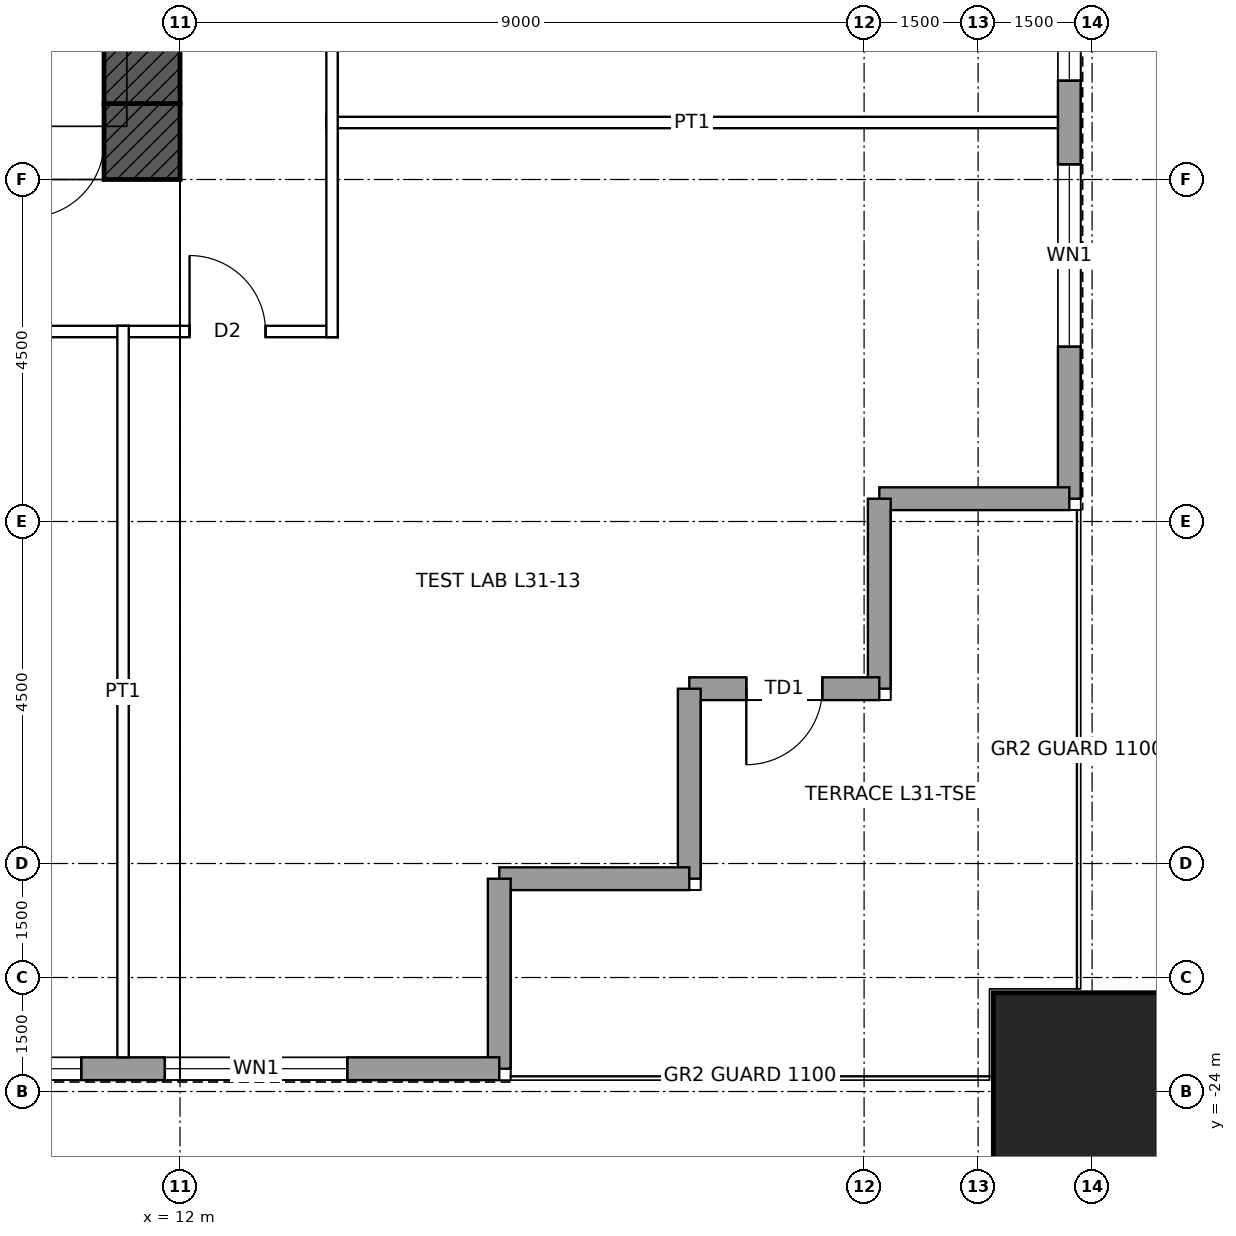
"""IFC4 building model, lengths in metres.
Left out: names, types, materials, properties, quantities, classifications, styles, units other than length and angle.
Written with IfcOpenShell. Run it as: python <this file> out.ifc"""

import sys

from ifc_helpers import new_model, si_unit, direction, frame, frame_2d, origin, origin_2d, place, context, subcontext, project, spatial, rectangle, hollow_rectangle, extrude, element, fill, save


model = new_model("IFC4")
c1 = context("Model", 3, precision=1e-05, world=origin(), true_north=direction((0.0, 1.0)))
c2 = subcontext(c1, "Body", "Model", "MODEL_VIEW")
j1 = project(units=[si_unit("LENGTHUNIT", "METRE"), si_unit("PLANEANGLEUNIT", "RADIAN")], contexts=[c1])
p1 = place(None, origin())
s1 = spatial("IfcSite", under=j1, at=p1, CompositionType="ELEMENT")
p2 = place(p1, origin())
s2 = spatial("IfcBuilding", under=s1, at=p2, CompositionType="ELEMENT")
p3 = place(p2, frame((0.0, 0.0, 153.9)))
s3 = spatial("IfcBuildingStorey", under=s2, at=p3, CompositionType="ELEMENT", Elevation=153.9)
p4 = place(p3, frame((24.0, -24.0, 0.0), z_axis=(0.0, 0.0, 1.0), x_axis=(1.0, 0.0, 0.0)))
e1 = element("IfcColumn", 1, at=p4, inside=s3, PredefinedType="COLUMN", context=c2, shape_type="SweptSolid", body=[
    extrude(hollow_rectangle(XDim=2.6, YDim=2.6, WallThickness=0.13, at=origin_2d()), origin(), (0.0, 0.0, 1.0), 4.5),
])
p5 = place(p3, frame((12.0, -11.5, 0.0), z_axis=(0.0, 0.0, 1.0), x_axis=(-1.0, 0.0, 0.0)))
e2 = element("IfcWall", 2, at=p5, inside=s3, PredefinedType="SHEAR", context=c2, shape_type="SweptSolid", body=[
    extrude(rectangle(XDim=24.0, YDim=1.0, at=frame_2d((12.0, 0.0))), origin(), (0.0, 0.0, 1.0), 4.5),
])
p6 = place(p5, frame((11.5, 0.0, 0.0)))
e3 = element("IfcOpeningElement", 3, at=p6, cuts=e2, PredefinedType="OPENING", context=c2, shape_type="SweptSolid", body=[
    extrude(rectangle(XDim=1.0, YDim=2.1, at=frame_2d((0.5, 1.05))), frame((0.0, 0.51, 0.0), z_axis=(0.0, -1.0, 0.0), x_axis=(1.0, 0.0, 0.0)), (0.0, 0.0, 1.0), 1.02),
])
p7 = place(p5, frame((1.0, 0.0, 0.0)))
e4 = element("IfcOpeningElement", 4, at=p7, cuts=e2, PredefinedType="OPENING", context=c2, shape_type="SweptSolid", body=[
    extrude(rectangle(XDim=1.0, YDim=2.4, at=frame_2d((0.5, 1.2))), frame((0.0, 0.51, 0.0), z_axis=(0.0, -1.0, 0.0), x_axis=(1.0, 0.0, 0.0)), (0.0, 0.0, 1.0), 1.02),
])
p8 = place(p3, frame((11.5, 11.0, 0.0), z_axis=(0.0, 0.0, 1.0), x_axis=(0.0, -1.0, 0.0)))
e5 = element("IfcWall", 5, at=p8, inside=s3, PredefinedType="SHEAR", context=c2, shape_type="SweptSolid", body=[
    extrude(rectangle(XDim=22.0, YDim=1.0, at=frame_2d((11.0, 0.0))), origin(), (0.0, 0.0, 1.0), 4.5),
])
p9 = place(p8, frame((10.5, 0.0, 0.0)))
e6 = element("IfcOpeningElement", 6, at=p9, cuts=e5, PredefinedType="OPENING", context=c2, shape_type="SweptSolid", body=[
    extrude(rectangle(XDim=1.0, YDim=2.4, at=frame_2d((0.5, 1.2))), frame((0.0, 0.51, 0.0), z_axis=(0.0, -1.0, 0.0), x_axis=(1.0, 0.0, 0.0)), (0.0, 0.0, 1.0), 1.02),
])
p10 = place(p3, frame((23.7, 16.2, 0.0), z_axis=(0.0, 0.0, 1.0), x_axis=(0.0, -1.0, 0.0)))
e7 = element("IfcWall", 7, at=p10, inside=s3, PredefinedType="SOLIDWALL", context=c2, shape_type="SweptSolid", body=[
    extrude(rectangle(XDim=32.4, YDim=0.3, at=frame_2d((16.2, 0.0))), origin(), (0.0, 0.0, 1.0), 4.3),
])
p11 = place(p10, frame((2.0, 0.0, 1.0)))
e8 = element("IfcOpeningElement", 8, at=p11, cuts=e7, PredefinedType="OPENING", context=c2, shape_type="SweptSolid", body=[
    extrude(rectangle(XDim=2.4, YDim=1.2, at=frame_2d((1.2, 0.6))), frame((0.0, 0.16, 0.0), z_axis=(0.0, -1.0, 0.0), x_axis=(1.0, 0.0, 0.0)), (0.0, 0.0, 1.0), 0.32),
])
p12 = place(p10, frame((5.5, 0.0, 1.0)))
e9 = element("IfcOpeningElement", 9, at=p12, cuts=e7, PredefinedType="OPENING", context=c2, shape_type="SweptSolid", body=[
    extrude(rectangle(XDim=2.4, YDim=1.2, at=frame_2d((1.2, 0.6))), frame((0.0, 0.16, 0.0), z_axis=(0.0, -1.0, 0.0), x_axis=(1.0, 0.0, 0.0)), (0.0, 0.0, 1.0), 0.32),
])
p13 = place(p10, frame((9.1, 0.0, 1.0)))
e10 = element("IfcOpeningElement", 10, at=p13, cuts=e7, PredefinedType="OPENING", context=c2, shape_type="SweptSolid", body=[
    extrude(rectangle(XDim=2.4, YDim=1.2, at=frame_2d((1.2, 0.6))), frame((0.0, 0.16, 0.0), z_axis=(0.0, -1.0, 0.0), x_axis=(1.0, 0.0, 0.0)), (0.0, 0.0, 1.0), 0.32),
])
p14 = place(p10, frame((11.8, 0.0, 1.0)))
e11 = element("IfcOpeningElement", 11, at=p14, cuts=e7, PredefinedType="OPENING", context=c2, shape_type="SweptSolid", body=[
    extrude(rectangle(XDim=2.4, YDim=1.2, at=frame_2d((1.2, 0.6))), frame((0.0, 0.16, 0.0), z_axis=(0.0, -1.0, 0.0), x_axis=(1.0, 0.0, 0.0)), (0.0, 0.0, 1.0), 0.32),
])
p15 = place(p10, frame((18.2, 0.0, 1.0)))
e12 = element("IfcOpeningElement", 12, at=p15, cuts=e7, PredefinedType="OPENING", context=c2, shape_type="SweptSolid", body=[
    extrude(rectangle(XDim=2.4, YDim=1.2, at=frame_2d((1.2, 0.6))), frame((0.0, 0.16, 0.0), z_axis=(0.0, -1.0, 0.0), x_axis=(1.0, 0.0, 0.0)), (0.0, 0.0, 1.0), 0.32),
])
p16 = place(p10, frame((20.9, 0.0, 1.0)))
e13 = element("IfcOpeningElement", 13, at=p16, cuts=e7, PredefinedType="OPENING", context=c2, shape_type="SweptSolid", body=[
    extrude(rectangle(XDim=2.4, YDim=1.2, at=frame_2d((1.2, 0.6))), frame((0.0, 0.16, 0.0), z_axis=(0.0, -1.0, 0.0), x_axis=(1.0, 0.0, 0.0)), (0.0, 0.0, 1.0), 0.32),
])
p17 = place(p10, frame((24.5, 0.0, 1.0)))
e14 = element("IfcOpeningElement", 14, at=p17, cuts=e7, PredefinedType="OPENING", context=c2, shape_type="SweptSolid", body=[
    extrude(rectangle(XDim=2.4, YDim=1.2, at=frame_2d((1.2, 0.6))), frame((0.0, 0.16, 0.0), z_axis=(0.0, -1.0, 0.0), x_axis=(1.0, 0.0, 0.0)), (0.0, 0.0, 1.0), 0.32),
])
p18 = place(p10, frame((28.0, 0.0, 1.0)))
e15 = element("IfcOpeningElement", 15, at=p18, cuts=e7, PredefinedType="OPENING", context=c2, shape_type="SweptSolid", body=[
    extrude(rectangle(XDim=2.4, YDim=1.2, at=frame_2d((1.2, 0.6))), frame((0.0, 0.16, 0.0), z_axis=(0.0, -1.0, 0.0), x_axis=(1.0, 0.0, 0.0)), (0.0, 0.0, 1.0), 0.32),
])
for number, where, z_axis, x_axis in (
    (16, (23.7, -16.2, 0.0), (0.0, 0.0, 1.0), (-1.0, 0.0, 0.0)),
    (17, (21.2, -16.2, 0.0), (0.0, 0.0, 1.0), (0.0, -1.0, 0.0)),
):
    element("IfcWall", number, at=place(p3, frame(where, z_axis=z_axis, x_axis=x_axis)), inside=s3, PredefinedType="SOLIDWALL", context=c2, shape_type="SweptSolid", body=[
        extrude(rectangle(XDim=2.5, YDim=0.3, at=frame_2d((1.25, 0.0))), origin(), (0.0, 0.0, 1.0), 4.3),
    ])
p19 = place(p3, frame((21.2, -18.7, 0.0), z_axis=(0.0, 0.0, 1.0), x_axis=(-1.0, 0.0, 0.0)))
e18 = element("IfcWall", 18, at=p19, inside=s3, PredefinedType="SOLIDWALL", context=c2, shape_type="SweptSolid", body=[
    extrude(rectangle(XDim=2.5, YDim=0.3, at=frame_2d((1.25, 0.0))), origin(), (0.0, 0.0, 1.0), 4.3),
])
p20 = place(p19, frame((0.75, 0.0, 0.0)))
e19 = element("IfcOpeningElement", 19, at=p20, cuts=e18, PredefinedType="OPENING", context=c2, shape_type="SweptSolid", body=[
    extrude(rectangle(XDim=1.0, YDim=2.4, at=frame_2d((0.5, 1.2))), frame((0.0, 0.16, 0.0), z_axis=(0.0, -1.0, 0.0), x_axis=(1.0, 0.0, 0.0)), (0.0, 0.0, 1.0), 0.32),
])
for number, where, z_axis, x_axis in (
    (20, (18.7, -18.7, 0.0), (0.0, 0.0, 1.0), (0.0, -1.0, 0.0)),
    (21, (18.7, -21.2, 0.0), (0.0, 0.0, 1.0), (-1.0, 0.0, 0.0)),
    (22, (16.2, -21.2, 0.0), (0.0, 0.0, 1.0), (0.0, -1.0, 0.0)),
):
    element("IfcWall", number, at=place(p3, frame(where, z_axis=z_axis, x_axis=x_axis)), inside=s3, PredefinedType="SOLIDWALL", context=c2, shape_type="SweptSolid", body=[
        extrude(rectangle(XDim=2.5, YDim=0.3, at=frame_2d((1.25, 0.0))), origin(), (0.0, 0.0, 1.0), 4.3),
    ])
p21 = place(p3, frame((16.2, -23.7, 0.0), z_axis=(0.0, 0.0, 1.0), x_axis=(-1.0, 0.0, 0.0)))
e23 = element("IfcWall", 23, at=p21, inside=s3, PredefinedType="SOLIDWALL", context=c2, shape_type="SweptSolid", body=[
    extrude(rectangle(XDim=32.4, YDim=0.3, at=frame_2d((16.2, 0.0))), origin(), (0.0, 0.0, 1.0), 4.3),
])
p22 = place(p21, frame((2.0, 0.0, 1.0)))
e24 = element("IfcOpeningElement", 24, at=p22, cuts=e23, PredefinedType="OPENING", context=c2, shape_type="SweptSolid", body=[
    extrude(rectangle(XDim=2.4, YDim=1.2, at=frame_2d((1.2, 0.6))), frame((0.0, 0.16, 0.0), z_axis=(0.0, -1.0, 0.0), x_axis=(1.0, 0.0, 0.0)), (0.0, 0.0, 1.0), 0.32),
])
p23 = place(p21, frame((5.5, 0.0, 1.0)))
e25 = element("IfcOpeningElement", 25, at=p23, cuts=e23, PredefinedType="OPENING", context=c2, shape_type="SweptSolid", body=[
    extrude(rectangle(XDim=2.4, YDim=1.2, at=frame_2d((1.2, 0.6))), frame((0.0, 0.16, 0.0), z_axis=(0.0, -1.0, 0.0), x_axis=(1.0, 0.0, 0.0)), (0.0, 0.0, 1.0), 0.32),
])
p24 = place(p21, frame((9.1, 0.0, 1.0)))
e26 = element("IfcOpeningElement", 26, at=p24, cuts=e23, PredefinedType="OPENING", context=c2, shape_type="SweptSolid", body=[
    extrude(rectangle(XDim=2.4, YDim=1.2, at=frame_2d((1.2, 0.6))), frame((0.0, 0.16, 0.0), z_axis=(0.0, -1.0, 0.0), x_axis=(1.0, 0.0, 0.0)), (0.0, 0.0, 1.0), 0.32),
])
p25 = place(p21, frame((11.8, 0.0, 1.0)))
e27 = element("IfcOpeningElement", 27, at=p25, cuts=e23, PredefinedType="OPENING", context=c2, shape_type="SweptSolid", body=[
    extrude(rectangle(XDim=2.4, YDim=1.2, at=frame_2d((1.2, 0.6))), frame((0.0, 0.16, 0.0), z_axis=(0.0, -1.0, 0.0), x_axis=(1.0, 0.0, 0.0)), (0.0, 0.0, 1.0), 0.32),
])
p26 = place(p21, frame((18.2, 0.0, 1.0)))
e28 = element("IfcOpeningElement", 28, at=p26, cuts=e23, PredefinedType="OPENING", context=c2, shape_type="SweptSolid", body=[
    extrude(rectangle(XDim=2.4, YDim=1.2, at=frame_2d((1.2, 0.6))), frame((0.0, 0.16, 0.0), z_axis=(0.0, -1.0, 0.0), x_axis=(1.0, 0.0, 0.0)), (0.0, 0.0, 1.0), 0.32),
])
p27 = place(p21, frame((20.9, 0.0, 1.0)))
e29 = element("IfcOpeningElement", 29, at=p27, cuts=e23, PredefinedType="OPENING", context=c2, shape_type="SweptSolid", body=[
    extrude(rectangle(XDim=2.4, YDim=1.2, at=frame_2d((1.2, 0.6))), frame((0.0, 0.16, 0.0), z_axis=(0.0, -1.0, 0.0), x_axis=(1.0, 0.0, 0.0)), (0.0, 0.0, 1.0), 0.32),
])
p28 = place(p21, frame((24.5, 0.0, 1.0)))
e30 = element("IfcOpeningElement", 30, at=p28, cuts=e23, PredefinedType="OPENING", context=c2, shape_type="SweptSolid", body=[
    extrude(rectangle(XDim=2.4, YDim=1.2, at=frame_2d((1.2, 0.6))), frame((0.0, 0.16, 0.0), z_axis=(0.0, -1.0, 0.0), x_axis=(1.0, 0.0, 0.0)), (0.0, 0.0, 1.0), 0.32),
])
p29 = place(p21, frame((28.0, 0.0, 1.0)))
e31 = element("IfcOpeningElement", 31, at=p29, cuts=e23, PredefinedType="OPENING", context=c2, shape_type="SweptSolid", body=[
    extrude(rectangle(XDim=2.4, YDim=1.2, at=frame_2d((1.2, 0.6))), frame((0.0, 0.16, 0.0), z_axis=(0.0, -1.0, 0.0), x_axis=(1.0, 0.0, 0.0)), (0.0, 0.0, 1.0), 0.32),
])
p30 = place(p3, frame((-14.075, -14.0, 0.0), z_axis=(0.0, 0.0, 1.0), x_axis=(1.0, 0.0, 0.0)))
e32 = element("IfcWall", 32, at=p30, inside=s3, PredefinedType="PARTITIONING", context=c2, shape_type="SweptSolid", body=[
    extrude(rectangle(XDim=28.15, YDim=0.15, at=frame_2d((14.075, 0.0))), origin(), (0.0, 0.0, 1.0), 4.3),
])
p31 = place(p30, frame((18.8, 0.0, 0.0)))
e33 = element("IfcOpeningElement", 33, at=p31, cuts=e32, PredefinedType="OPENING", context=c2, shape_type="SweptSolid", body=[
    extrude(rectangle(XDim=1.8, YDim=2.4, at=frame_2d((0.9, 1.2))), frame((0.0, 0.085, 0.0), z_axis=(0.0, -1.0, 0.0), x_axis=(1.0, 0.0, 0.0)), (0.0, 0.0, 1.0), 0.17),
])
p32 = place(p30, frame((9.425, 0.0, 0.0)))
e34 = element("IfcOpeningElement", 34, at=p32, cuts=e32, PredefinedType="OPENING", context=c2, shape_type="SweptSolid", body=[
    extrude(rectangle(XDim=1.8, YDim=2.4, at=frame_2d((0.9, 1.2))), frame((0.0, 0.085, 0.0), z_axis=(0.0, -1.0, 0.0), x_axis=(1.0, 0.0, 0.0)), (0.0, 0.0, 1.0), 0.17),
])
p33 = place(p30, frame((4.2, 0.0, 0.0)))
e35 = element("IfcOpeningElement", 35, at=p33, cuts=e32, PredefinedType="OPENING", context=c2, shape_type="SweptSolid", body=[
    extrude(rectangle(XDim=1.0, YDim=2.1, at=frame_2d((0.5, 1.05))), frame((0.0, 0.085, 0.0), z_axis=(0.0, -1.0, 0.0), x_axis=(1.0, 0.0, 0.0)), (0.0, 0.0, 1.0), 0.17),
])
p34 = place(p30, frame((26.2, 0.0, 0.0)))
e36 = element("IfcOpeningElement", 36, at=p34, cuts=e32, PredefinedType="OPENING", context=c2, shape_type="SweptSolid", body=[
    extrude(rectangle(XDim=1.0, YDim=2.1, at=frame_2d((0.5, 1.05))), frame((0.0, 0.085, 0.0), z_axis=(0.0, -1.0, 0.0), x_axis=(1.0, 0.0, 0.0)), (0.0, 0.0, 1.0), 0.17),
])
p35 = place(p30, frame((0.95, 0.0, 0.0)))
e37 = element("IfcOpeningElement", 37, at=p35, cuts=e32, PredefinedType="OPENING", context=c2, shape_type="SweptSolid", body=[
    extrude(rectangle(XDim=1.0, YDim=2.1, at=frame_2d((0.5, 1.05))), frame((0.0, 0.085, 0.0), z_axis=(0.0, -1.0, 0.0), x_axis=(1.0, 0.0, 0.0)), (0.0, 0.0, 1.0), 0.17),
])
for number, where, z_axis, x_axis in (
    (38, (13.925, -11.25, 0.0), (0.0, 0.0, 1.0), (1.0, 0.0, 0.0)),
    (39, (11.25, -23.55, 0.0), (0.0, 0.0, 1.0), (0.0, 1.0, 0.0)),
):
    element("IfcWall", number, at=place(p3, frame(where, z_axis=z_axis, x_axis=x_axis)), inside=s3, PredefinedType="PARTITIONING", context=c2, shape_type="SweptSolid", body=[
        extrude(rectangle(XDim=9.625, YDim=0.15, at=frame_2d((4.812, 0.0))), origin(), (0.0, 0.0, 1.0), 3.431),
    ])
p36 = place(p3, frame((14.0, -14.075, 0.0), z_axis=(0.0, 0.0, 1.0), x_axis=(0.0, 1.0, 0.0)))
e40 = element("IfcWall", 40, at=p36, inside=s3, PredefinedType="PARTITIONING", context=c2, shape_type="SweptSolid", body=[
    extrude(rectangle(XDim=26.15, YDim=0.15, at=frame_2d((13.075, 0.0))), origin(), (0.0, 0.0, 1.0), 4.3),
])
p37 = place(p36, frame((18.8, 0.0, 0.0)))
e41 = element("IfcOpeningElement", 41, at=p37, cuts=e40, PredefinedType="OPENING", context=c2, shape_type="SweptSolid", body=[
    extrude(rectangle(XDim=1.8, YDim=2.4, at=frame_2d((0.9, 1.2))), frame((0.0, 0.085, 0.0), z_axis=(0.0, -1.0, 0.0), x_axis=(1.0, 0.0, 0.0)), (0.0, 0.0, 1.0), 0.17),
])
p38 = place(p36, frame((7.55, 0.0, 0.0)))
e42 = element("IfcOpeningElement", 42, at=p38, cuts=e40, PredefinedType="OPENING", context=c2, shape_type="SweptSolid", body=[
    extrude(rectangle(XDim=1.8, YDim=2.4, at=frame_2d((0.9, 1.2))), frame((0.0, 0.085, 0.0), z_axis=(0.0, -1.0, 0.0), x_axis=(1.0, 0.0, 0.0)), (0.0, 0.0, 1.0), 0.17),
])
p39 = place(p17, origin())
e43 = element("IfcWindow", 43, at=p39, inside=s3, PartitioningType="SINGLE_PANEL", PredefinedType="WINDOW", context=c2, shape_type="SweptSolid", body=[
    extrude(rectangle(XDim=2.4, YDim=1.2, at=frame_2d((1.2, 0.6))), frame((0.0, 0.03, 0.0), z_axis=(0.0, -1.0, 0.0), x_axis=(1.0, 0.0, 0.0)), (0.0, 0.0, 1.0), 0.06),
])
fill(e14, e43)
p40 = place(p18, origin())
e44 = element("IfcWindow", 44, at=p40, inside=s3, PartitioningType="SINGLE_PANEL", PredefinedType="WINDOW", context=c2, shape_type="SweptSolid", body=[
    extrude(rectangle(XDim=2.4, YDim=1.2, at=frame_2d((1.2, 0.6))), frame((0.0, 0.03, 0.0), z_axis=(0.0, -1.0, 0.0), x_axis=(1.0, 0.0, 0.0)), (0.0, 0.0, 1.0), 0.06),
])
fill(e15, e44)
p41 = place(p20, origin())
e45 = element("IfcDoor", 45, at=p41, inside=s3, OperationType="SINGLE_SWING_RIGHT", PredefinedType="DOOR", context=c2, shape_type="SweptSolid", body=[
    extrude(rectangle(XDim=1.0, YDim=2.4, at=frame_2d((0.5, 1.2))), frame((0.0, 0.025, 0.0), z_axis=(0.0, -1.0, 0.0), x_axis=(1.0, 0.0, 0.0)), (0.0, 0.0, 1.0), 0.05),
])
fill(e19, e45)
p42 = place(p22, origin())
e46 = element("IfcWindow", 46, at=p42, inside=s3, PartitioningType="SINGLE_PANEL", PredefinedType="WINDOW", context=c2, shape_type="SweptSolid", body=[
    extrude(rectangle(XDim=2.4, YDim=1.2, at=frame_2d((1.2, 0.6))), frame((0.0, 0.03, 0.0), z_axis=(0.0, -1.0, 0.0), x_axis=(1.0, 0.0, 0.0)), (0.0, 0.0, 1.0), 0.06),
])
fill(e24, e46)
p43 = place(p23, origin())
e47 = element("IfcWindow", 47, at=p43, inside=s3, PartitioningType="SINGLE_PANEL", PredefinedType="WINDOW", context=c2, shape_type="SweptSolid", body=[
    extrude(rectangle(XDim=2.4, YDim=1.2, at=frame_2d((1.2, 0.6))), frame((0.0, 0.03, 0.0), z_axis=(0.0, -1.0, 0.0), x_axis=(1.0, 0.0, 0.0)), (0.0, 0.0, 1.0), 0.06),
])
fill(e25, e47)
p44 = place(p7, origin())
e48 = element("IfcDoor", 48, at=p44, inside=s3, OperationType="SINGLE_SWING_RIGHT", PredefinedType="DOOR", context=c2, shape_type="SweptSolid", body=[
    extrude(rectangle(XDim=1.0, YDim=2.4, at=frame_2d((0.5, 1.2))), frame((0.0, 0.485, 0.0), z_axis=(0.0, -1.0, 0.0), x_axis=(1.0, 0.0, 0.0)), (0.0, 0.0, 1.0), 0.05),
])
fill(e4, e48)
p45 = place(p34, origin())
e49 = element("IfcDoor", 49, at=p45, inside=s3, OperationType="SINGLE_SWING_LEFT", PredefinedType="DOOR", context=c2, shape_type="SweptSolid", body=[
    extrude(rectangle(XDim=1.0, YDim=2.1, at=frame_2d((0.5, 1.05))), frame((0.0, 0.025, 0.0), z_axis=(0.0, -1.0, 0.0), x_axis=(1.0, 0.0, 0.0)), (0.0, 0.0, 1.0), 0.05),
])
fill(e36, e49)
save(model, sys.argv[1])
